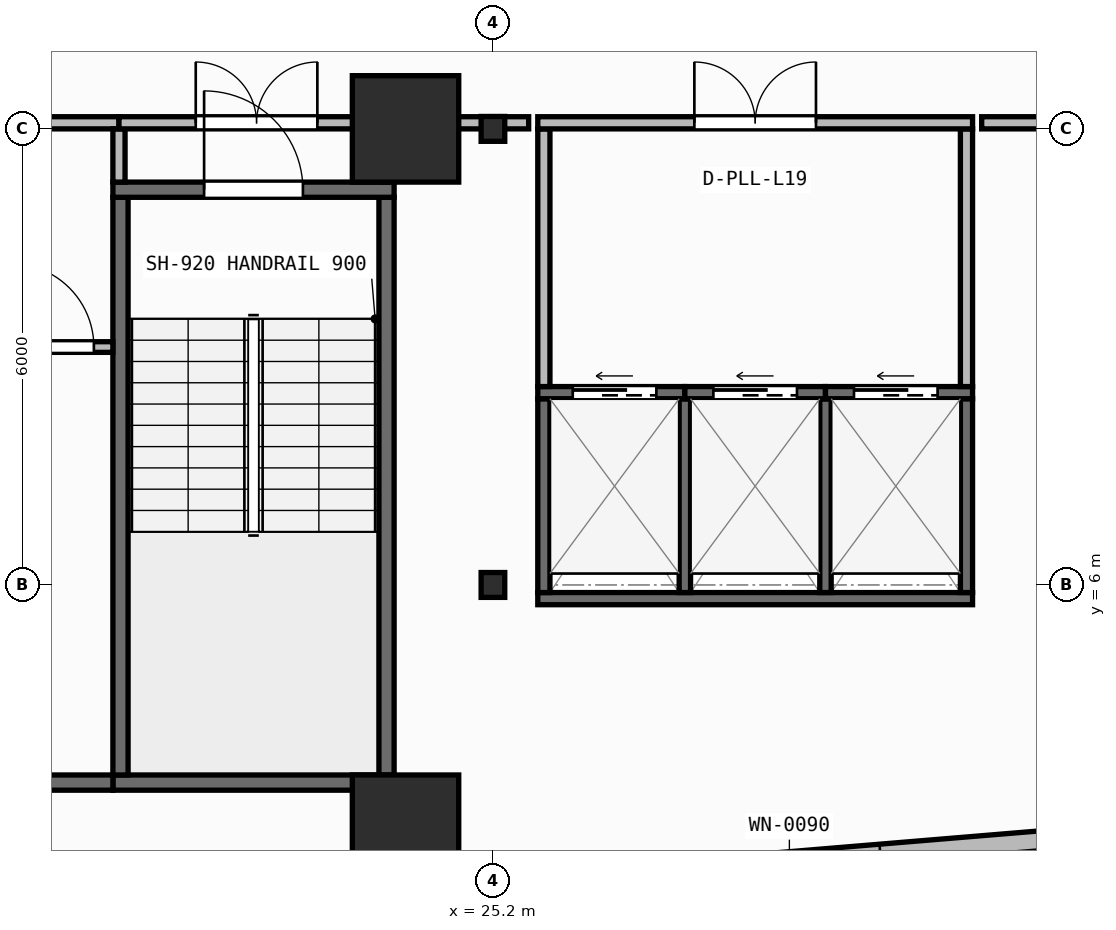
"""IFC4 building model, lengths in metres.
Left out: names, types, materials, properties, quantities, classifications, styles, units other than length and angle.
Written with IfcOpenShell. Run it as: python <this file> out.ifc"""

import sys

from ifc_helpers import new_model, si_unit, direction, frame, frame_2d, origin, origin_2d, place, context, subcontext, project, spatial, rectangle, i_section, extrude, element, fill, save


model = new_model("IFC4")
c1 = context("Model", 3, precision=1e-05, world=origin(), true_north=direction((0.0, 1.0)))
c2 = subcontext(c1, "Body", "Model", "MODEL_VIEW")
j1 = project(units=[si_unit("LENGTHUNIT", "METRE"), si_unit("PLANEANGLEUNIT", "RADIAN")], contexts=[c1])
p1 = place(None, origin())
s1 = spatial("IfcSite", under=j1, at=p1, CompositionType="ELEMENT")
p2 = place(p1, origin())
s2 = spatial("IfcBuilding", under=s1, at=p2, CompositionType="ELEMENT")
p3 = place(p2, frame((0.0, 0.0, 77.8)))
s3 = spatial("IfcBuildingStorey", under=s2, at=p3, CompositionType="ELEMENT", Elevation=77.8)
p4 = place(p3, frame((24.05, 2.8, 0.0), z_axis=(0.0, 0.0, 1.0), x_axis=(1.0, 0.0, 0.0)))
e1 = element("IfcColumn", 1, at=p4, inside=s3, PredefinedType="COLUMN", context=c2, shape_type="SweptSolid", body=[
    extrude(rectangle(XDim=1.4, YDim=1.4, at=origin_2d()), origin(), (0.0, 0.0, 1.0), 3.95),
])
p5 = place(p3, frame((25.2, 6.0, 0.0), z_axis=(0.0, 0.0, 1.0), x_axis=(1.0, 0.0, 0.0)))
e2 = element("IfcColumn", 2, at=p5, inside=s3, PredefinedType="COLUMN", context=c2, shape_type="SweptSolid", body=[
    extrude(i_section(OverallWidth=0.311, OverallDepth=0.327, WebThickness=0.016, FlangeThickness=0.025, FilletRadius=0.017, at=origin_2d()), origin(), (0.0, 0.0, 1.0), 3.95),
])
p6 = place(p3, frame((24.05, 12.0, 0.0), z_axis=(0.0, 0.0, 1.0), x_axis=(1.0, 0.0, 0.0)))
e3 = element("IfcColumn", 3, at=p6, inside=s3, PredefinedType="COLUMN", context=c2, shape_type="SweptSolid", body=[
    extrude(rectangle(XDim=1.4, YDim=1.4, at=origin_2d()), origin(), (0.0, 0.0, 1.0), 3.95),
])
p7 = place(p3, frame((25.2, 12.0, 0.0), z_axis=(0.0, 0.0, 1.0), x_axis=(1.0, 0.0, 0.0)))
e4 = element("IfcColumn", 4, at=p7, inside=s3, PredefinedType="COLUMN", context=c2, shape_type="SweptSolid", body=[
    extrude(i_section(OverallWidth=0.311, OverallDepth=0.327, WebThickness=0.016, FlangeThickness=0.025, FilletRadius=0.017, at=origin_2d()), origin(), (0.0, 0.0, 1.0), 3.95),
])
p8 = place(p3, frame((2.76, 0.174, 0.0), z_axis=(0.0, 0.0, 1.0), x_axis=(0.996571478456, 0.082736257641, 0.0)))
e5 = element("IfcWall", 5, at=p8, inside=s3, PredefinedType="STANDARD", context=c2, shape_type="SweptSolid", body=[
    extrude(rectangle(XDim=52.861, YDim=0.26, at=frame_2d((26.431, 0.0))), origin(), (0.0, 0.0, 1.0), 3.71),
])
p9 = place(p8, frame((25.231, 0.0, 0.9)))
e6 = element("IfcOpeningElement", 6, at=p9, cuts=e5, PredefinedType="OPENING", context=c2, shape_type="SweptSolid", body=[
    extrude(rectangle(XDim=2.4, YDim=1.65, at=frame_2d((1.2, 0.825))), frame((0.0, 0.14, 0.0), z_axis=(0.0, -1.0, 0.0), x_axis=(1.0, 0.0, 0.0)), (0.0, 0.0, 1.0), 0.28),
])
p10 = place(p3, frame((20.2, 3.4, 0.0), z_axis=(0.0, 0.0, 1.0), x_axis=(1.0, 0.0, 0.0)))
e7 = element("IfcWall", 7, at=p10, inside=s3, PredefinedType="SHEAR", context=c2, shape_type="SweptSolid", body=[
    extrude(rectangle(XDim=3.7, YDim=0.2, at=frame_2d((1.85, 0.0))), origin(), (0.0, 0.0, 1.0), 3.71),
])
for number, where, z_axis, x_axis in (
    (8, (20.3, 3.5, 0.0), (0.0, 0.0, 1.0), (0.0, 1.0, 0.0)),
    (9, (23.8, 3.5, 0.0), (0.0, 0.0, 1.0), (0.0, 1.0, 0.0)),
):
    element("IfcWall", number, at=place(p3, frame(where, z_axis=z_axis, x_axis=x_axis)), inside=s3, PredefinedType="SHEAR", context=c2, shape_type="SweptSolid", body=[
        extrude(rectangle(XDim=7.6, YDim=0.2, at=frame_2d((3.8, 0.0))), origin(), (0.0, 0.0, 1.0), 3.71),
    ])
p11 = place(p3, frame((20.2, 11.2, 0.0), z_axis=(0.0, 0.0, 1.0), x_axis=(1.0, 0.0, 0.0)))
e10 = element("IfcWall", 10, at=p11, inside=s3, PredefinedType="SHEAR", context=c2, shape_type="SweptSolid", body=[
    extrude(rectangle(XDim=3.7, YDim=0.2, at=frame_2d((1.85, 0.0))), origin(), (0.0, 0.0, 1.0), 3.71),
])
p12 = place(p11, frame((1.2, 0.0, 0.0)))
e11 = element("IfcOpeningElement", 11, at=p12, cuts=e10, PredefinedType="OPENING", context=c2, shape_type="SweptSolid", body=[
    extrude(rectangle(XDim=1.3, YDim=2.15, at=frame_2d((0.65, 1.075))), frame((0.0, 0.11, 0.0), z_axis=(0.0, -1.0, 0.0), x_axis=(1.0, 0.0, 0.0)), (0.0, 0.0, 1.0), 0.22),
])
p13 = place(p3, frame((6.5, 3.4, 0.0), z_axis=(0.0, 0.0, 1.0), x_axis=(1.0, 0.0, 0.0)))
e12 = element("IfcWall", 12, at=p13, inside=s3, PredefinedType="SHEAR", context=c2, shape_type="SweptSolid", body=[
    extrude(rectangle(XDim=13.7, YDim=0.2, at=frame_2d((6.85, 0.0))), origin(), (0.0, 0.0, 1.0), 3.71),
])
p14 = place(p3, frame((25.79, 5.82, 0.0), z_axis=(0.0, 0.0, 1.0), x_axis=(1.0, 0.0, 0.0)))
e13 = element("IfcWall", 13, at=p14, inside=s3, PredefinedType="SHEAR", context=c2, shape_type="SweptSolid", body=[
    extrude(rectangle(XDim=5.72, YDim=0.16, at=frame_2d((2.86, 0.0))), origin(), (0.0, 0.0, 1.0), 3.71),
])
for number, where, z_axis, x_axis in (
    (14, (25.87, 5.9, 0.0), (0.0, 0.0, 1.0), (0.0, 1.0, 0.0)),
    (15, (31.43, 5.9, 0.0), (0.0, 0.0, 1.0), (0.0, 1.0, 0.0)),
):
    element("IfcWall", number, at=place(p3, frame(where, z_axis=z_axis, x_axis=x_axis)), inside=s3, PredefinedType="SHEAR", context=c2, shape_type="SweptSolid", body=[
        extrude(rectangle(XDim=2.55, YDim=0.16, at=frame_2d((1.275, 0.0))), origin(), (0.0, 0.0, 1.0), 3.71),
    ])
for number, where, z_axis, x_axis in (
    (16, (27.725, 5.9, 0.0), (0.0, 0.0, 1.0), (0.0, 1.0, 0.0)),
    (17, (29.575, 5.9, 0.0), (0.0, 0.0, 1.0), (0.0, 1.0, 0.0)),
):
    element("IfcWall", number, at=place(p3, frame(where, z_axis=z_axis, x_axis=x_axis)), inside=s3, PredefinedType="SHEAR", context=c2, shape_type="SweptSolid", body=[
        extrude(rectangle(XDim=2.55, YDim=0.15, at=frame_2d((1.275, 0.0))), origin(), (0.0, 0.0, 1.0), 3.71),
    ])
p15 = place(p3, frame((25.79, 8.53, 0.0), z_axis=(0.0, 0.0, 1.0), x_axis=(1.0, 0.0, 0.0)))
e18 = element("IfcWall", 18, at=p15, inside=s3, PredefinedType="SHEAR", context=c2, shape_type="SweptSolid", body=[
    extrude(rectangle(XDim=1.935, YDim=0.16, at=frame_2d((0.968, 0.0))), origin(), (0.0, 0.0, 1.0), 3.71),
])
p16 = place(p15, frame((0.46, 0.0, 0.0)))
e19 = element("IfcOpeningElement", 19, at=p16, cuts=e18, PredefinedType="OPENING", context=c2, shape_type="SweptSolid", body=[
    extrude(rectangle(XDim=1.1, YDim=2.15, at=frame_2d((0.55, 1.075))), frame((0.0, 0.09, 0.0), z_axis=(0.0, -1.0, 0.0), x_axis=(1.0, 0.0, 0.0)), (0.0, 0.0, 1.0), 0.18),
])
p17 = place(p3, frame((27.725, 8.53, 0.0), z_axis=(0.0, 0.0, 1.0), x_axis=(1.0, 0.0, 0.0)))
e20 = element("IfcWall", 20, at=p17, inside=s3, PredefinedType="SHEAR", context=c2, shape_type="SweptSolid", body=[
    extrude(rectangle(XDim=1.85, YDim=0.16, at=frame_2d((0.925, 0.0))), origin(), (0.0, 0.0, 1.0), 3.71),
])
p18 = place(p17, frame((0.375, 0.0, 0.0)))
e21 = element("IfcOpeningElement", 21, at=p18, cuts=e20, PredefinedType="OPENING", context=c2, shape_type="SweptSolid", body=[
    extrude(rectangle(XDim=1.1, YDim=2.15, at=frame_2d((0.55, 1.075))), frame((0.0, 0.09, 0.0), z_axis=(0.0, -1.0, 0.0), x_axis=(1.0, 0.0, 0.0)), (0.0, 0.0, 1.0), 0.18),
])
p19 = place(p3, frame((29.575, 8.53, 0.0), z_axis=(0.0, 0.0, 1.0), x_axis=(1.0, 0.0, 0.0)))
e22 = element("IfcWall", 22, at=p19, inside=s3, PredefinedType="SHEAR", context=c2, shape_type="SweptSolid", body=[
    extrude(rectangle(XDim=1.935, YDim=0.16, at=frame_2d((0.968, 0.0))), origin(), (0.0, 0.0, 1.0), 3.71),
])
p20 = place(p19, frame((0.375, 0.0, 0.0)))
e23 = element("IfcOpeningElement", 23, at=p20, cuts=e22, PredefinedType="OPENING", context=c2, shape_type="SweptSolid", body=[
    extrude(rectangle(XDim=1.1, YDim=2.15, at=frame_2d((0.55, 1.075))), frame((0.0, 0.09, 0.0), z_axis=(0.0, -1.0, 0.0), x_axis=(1.0, 0.0, 0.0)), (0.0, 0.0, 1.0), 0.18),
])
p21 = place(p3, frame((18.61, 9.13, 0.0), z_axis=(0.0, 0.0, 1.0), x_axis=(1.0, 0.0, 0.0)))
e24 = element("IfcWall", 24, at=p21, inside=s3, PredefinedType="PARTITIONING", context=c2, shape_type="SweptSolid", body=[
    extrude(rectangle(XDim=1.59, YDim=0.14, at=frame_2d((0.795, 0.0))), origin(), (0.0, 0.0, 1.0), 3.71),
])
p22 = place(p21, frame((0.24, 0.0, 0.0)))
e25 = element("IfcOpeningElement", 25, at=p22, cuts=e24, PredefinedType="OPENING", context=c2, shape_type="SweptSolid", body=[
    extrude(rectangle(XDim=1.1, YDim=2.1, at=frame_2d((0.55, 1.05))), frame((0.0, 0.08, 0.0), z_axis=(0.0, -1.0, 0.0), x_axis=(1.0, 0.0, 0.0)), (0.0, 0.0, 1.0), 0.16),
])
p23 = place(p3, frame((12.58, 12.08, 0.0), z_axis=(0.0, 0.0, 1.0), x_axis=(1.0, 0.0, 0.0)))
e26 = element("IfcWall", 26, at=p23, inside=s3, PredefinedType="PARTITIONING", context=c2, shape_type="SweptSolid", body=[
    extrude(rectangle(XDim=7.7, YDim=0.16, at=frame_2d((3.85, 0.0))), origin(), (0.0, 0.0, 1.0), 3.073),
])
p24 = place(p23, frame((3.05, 0.0, 0.0)))
e27 = element("IfcOpeningElement", 27, at=p24, cuts=e26, PredefinedType="OPENING", context=c2, shape_type="SweptSolid", body=[
    extrude(rectangle(XDim=1.6, YDim=2.05, at=frame_2d((0.8, 1.025))), frame((0.0, 0.09, 0.0), z_axis=(0.0, -1.0, 0.0), x_axis=(1.0, 0.0, 0.0)), (0.0, 0.0, 1.0), 0.18),
])
p25 = place(p3, frame((20.28, 11.3, 0.0), z_axis=(0.0, 0.0, 1.0), x_axis=(0.0, 1.0, 0.0)))
e28 = element("IfcWall", 28, at=p25, inside=s3, PredefinedType="PARTITIONING", context=c2, shape_type="SweptSolid", body=[
    extrude(rectangle(XDim=0.7, YDim=0.16, at=frame_2d((0.35, 0.0))), origin(), (0.0, 0.0, 1.0), 3.71),
])
p26 = place(p3, frame((20.28, 12.08, 0.0), z_axis=(0.0, 0.0, 1.0), x_axis=(1.0, 0.0, 0.0)))
e29 = element("IfcWall", 29, at=p26, inside=s3, PredefinedType="PARTITIONING", context=c2, shape_type="SweptSolid", body=[
    extrude(rectangle(XDim=3.62, YDim=0.16, at=frame_2d((1.81, 0.0))), origin(), (0.0, 0.0, 1.0), 3.073),
])
p27 = place(p26, frame((1.01, 0.0, 0.0)))
e30 = element("IfcOpeningElement", 30, at=p27, cuts=e29, PredefinedType="OPENING", context=c2, shape_type="SweptSolid", body=[
    extrude(rectangle(XDim=1.6, YDim=2.05, at=frame_2d((0.8, 1.025))), frame((0.0, 0.09, 0.0), z_axis=(0.0, -1.0, 0.0), x_axis=(1.0, 0.0, 0.0)), (0.0, 0.0, 1.0), 0.18),
])
p28 = place(p3, frame((23.82, 11.3, 0.0), z_axis=(0.0, 0.0, 1.0), x_axis=(0.0, 1.0, 0.0)))
e31 = element("IfcWall", 31, at=p28, inside=s3, PredefinedType="PARTITIONING", context=c2, shape_type="SweptSolid", body=[
    extrude(rectangle(XDim=0.7, YDim=0.16, at=frame_2d((0.35, 0.0))), origin(), (0.0, 0.0, 1.0), 3.71),
])
for number, where, z_axis, x_axis in (
    (32, (25.87, 8.61, 0.0), (0.0, 0.0, 1.0), (0.0, 1.0, 0.0)),
    (33, (31.43, 8.61, 0.0), (0.0, 0.0, 1.0), (0.0, 1.0, 0.0)),
):
    element("IfcWall", number, at=place(p3, frame(where, z_axis=z_axis, x_axis=x_axis)), inside=s3, PredefinedType="PARTITIONING", context=c2, shape_type="SweptSolid", body=[
        extrude(rectangle(XDim=3.39, YDim=0.16, at=frame_2d((1.695, 0.0))), origin(), (0.0, 0.0, 1.0), 3.71),
    ])
p29 = place(p3, frame((25.79, 12.08, 0.0), z_axis=(0.0, 0.0, 1.0), x_axis=(1.0, 0.0, 0.0)))
e34 = element("IfcWall", 34, at=p29, inside=s3, PredefinedType="PARTITIONING", context=c2, shape_type="SweptSolid", body=[
    extrude(rectangle(XDim=5.72, YDim=0.16, at=frame_2d((2.86, 0.0))), origin(), (0.0, 0.0, 1.0), 3.073),
])
p30 = place(p29, frame((2.06, 0.0, 0.0)))
e35 = element("IfcOpeningElement", 35, at=p30, cuts=e34, PredefinedType="OPENING", context=c2, shape_type="SweptSolid", body=[
    extrude(rectangle(XDim=1.6, YDim=2.05, at=frame_2d((0.8, 1.025))), frame((0.0, 0.09, 0.0), z_axis=(0.0, -1.0, 0.0), x_axis=(1.0, 0.0, 0.0)), (0.0, 0.0, 1.0), 0.18),
])
p31 = place(p3, frame((24.02, 12.08, 0.0), z_axis=(0.0, 0.0, 1.0), x_axis=(1.0, 0.0, 0.0)))
e36 = element("IfcWall", 36, at=p31, inside=s3, PredefinedType="PARTITIONING", context=c2, shape_type="SweptSolid", body=[
    extrude(rectangle(XDim=1.65, YDim=0.16, at=frame_2d((0.825, 0.0))), origin(), (0.0, 0.0, 1.0), 3.073),
])
p32 = place(p3, frame((31.63, 12.08, 0.0), z_axis=(0.0, 0.0, 1.0), x_axis=(1.0, 0.0, 0.0)))
e37 = element("IfcWall", 37, at=p32, inside=s3, PredefinedType="PARTITIONING", context=c2, shape_type="SweptSolid", body=[
    extrude(rectangle(XDim=11.181, YDim=0.16, at=frame_2d((5.59, 0.0))), origin(), (0.0, 0.0, 1.0), 3.073),
])
p33 = place(p12, origin())
e38 = element("IfcDoor", 38, at=p33, inside=s3, OperationType="SINGLE_SWING_LEFT", PredefinedType="DOOR", context=c2, shape_type="SweptSolid", body=[
    extrude(rectangle(XDim=1.3, YDim=2.15, at=frame_2d((0.65, 1.075))), frame((0.0, 0.025, 0.0), z_axis=(0.0, -1.0, 0.0), x_axis=(1.0, 0.0, 0.0)), (0.0, 0.0, 1.0), 0.05),
])
fill(e11, e38)
p34 = place(p16, origin())
e39 = element("IfcDoor", 39, at=p34, inside=s3, OperationType="SLIDING_TO_LEFT", PredefinedType="DOOR", context=c2, shape_type="SweptSolid", body=[
    extrude(rectangle(XDim=1.1, YDim=2.15, at=frame_2d((0.55, 1.075))), frame((0.0, 0.025, 0.0), z_axis=(0.0, -1.0, 0.0), x_axis=(1.0, 0.0, 0.0)), (0.0, 0.0, 1.0), 0.05),
])
fill(e19, e39)
p35 = place(p18, origin())
e40 = element("IfcDoor", 40, at=p35, inside=s3, OperationType="SLIDING_TO_LEFT", PredefinedType="DOOR", context=c2, shape_type="SweptSolid", body=[
    extrude(rectangle(XDim=1.1, YDim=2.15, at=frame_2d((0.55, 1.075))), frame((0.0, 0.025, 0.0), z_axis=(0.0, -1.0, 0.0), x_axis=(1.0, 0.0, 0.0)), (0.0, 0.0, 1.0), 0.05),
])
fill(e21, e40)
p36 = place(p20, origin())
e41 = element("IfcDoor", 41, at=p36, inside=s3, OperationType="SLIDING_TO_LEFT", PredefinedType="DOOR", context=c2, shape_type="SweptSolid", body=[
    extrude(rectangle(XDim=1.1, YDim=2.15, at=frame_2d((0.55, 1.075))), frame((0.0, 0.025, 0.0), z_axis=(0.0, -1.0, 0.0), x_axis=(1.0, 0.0, 0.0)), (0.0, 0.0, 1.0), 0.05),
])
fill(e23, e41)
p37 = place(p22, origin())
e42 = element("IfcDoor", 42, at=p37, inside=s3, OperationType="SINGLE_SWING_LEFT", PredefinedType="DOOR", context=c2, shape_type="SweptSolid", body=[
    extrude(rectangle(XDim=1.1, YDim=2.1, at=frame_2d((0.55, 1.05))), frame((0.0, 0.025, 0.0), z_axis=(0.0, -1.0, 0.0), x_axis=(1.0, 0.0, 0.0)), (0.0, 0.0, 1.0), 0.05),
])
fill(e25, e42)
p38 = place(p27, origin())
e43 = element("IfcDoor", 43, at=p38, inside=s3, OperationType="DOUBLE_DOOR_SINGLE_SWING", PredefinedType="DOOR", context=c2, shape_type="SweptSolid", body=[
    extrude(rectangle(XDim=1.6, YDim=2.05, at=frame_2d((0.8, 1.025))), frame((0.0, 0.025, 0.0), z_axis=(0.0, -1.0, 0.0), x_axis=(1.0, 0.0, 0.0)), (0.0, 0.0, 1.0), 0.05),
])
fill(e30, e43)
p39 = place(p30, origin())
e44 = element("IfcDoor", 44, at=p39, inside=s3, OperationType="DOUBLE_DOOR_SINGLE_SWING", PredefinedType="DOOR", context=c2, shape_type="SweptSolid", body=[
    extrude(rectangle(XDim=1.6, YDim=2.05, at=frame_2d((0.8, 1.025))), frame((0.0, 0.025, 0.0), z_axis=(0.0, -1.0, 0.0), x_axis=(1.0, 0.0, 0.0)), (0.0, 0.0, 1.0), 0.05),
])
fill(e35, e44)
save(model, sys.argv[1])
